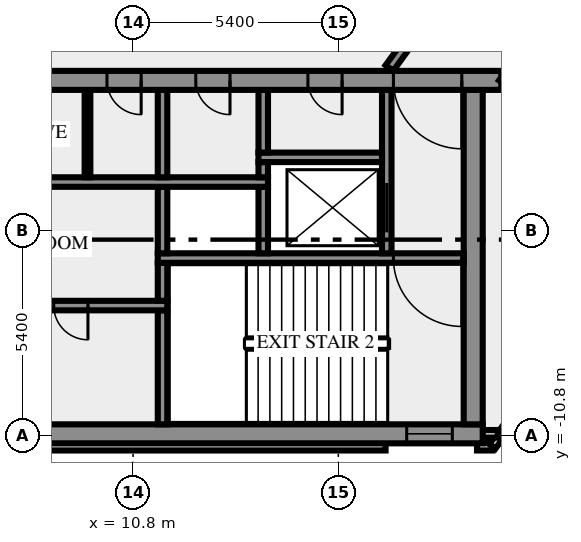
"""IFC4 building model, lengths in metres.
Left out: names, types, materials, properties, quantities, classifications, styles, units other than length and angle.
Written with IfcOpenShell. Run it as: python <this file> out.ifc"""

import sys

from ifc_helpers import new_model, si_unit, direction, frame, frame_2d, origin, place, context, subcontext, project, spatial, rectangle, extrude, element, fill, save


model = new_model("IFC4")
c1 = context("Model", 3, precision=1e-05, world=origin(), true_north=direction((0.0, 1.0)))
c2 = subcontext(c1, "Body", "Model", "MODEL_VIEW")
j1 = project(units=[si_unit("LENGTHUNIT", "METRE"), si_unit("PLANEANGLEUNIT", "RADIAN")], contexts=[c1])
p1 = place(None, origin())
s1 = spatial("IfcSite", under=j1, at=p1, CompositionType="ELEMENT")
p2 = place(p1, origin())
s2 = spatial("IfcBuilding", under=s1, at=p2, CompositionType="ELEMENT")
p3 = place(p2, frame((0.0, 0.0, 269.0)))
s3 = spatial("IfcBuildingStorey", under=s2, at=p3, CompositionType="ELEMENT", Elevation=269.0)
p4 = place(p3, frame((-17.444, -11.088, 0.0), z_axis=(0.0, 0.0, 1.0), x_axis=(1.0, 0.0, 0.0)))
e1 = element("IfcWall", 1, at=p4, inside=s3, PredefinedType="SOLIDWALL", context=c2, shape_type="SweptSolid", body=[
    extrude(rectangle(XDim=34.888, YDim=0.2, at=frame_2d((17.444, 0.0))), origin(), (0.0, 0.0, 1.0), 3.5),
])
p5 = place(p3, frame((19.85, -11.088, 0.0), z_axis=(0.0, 0.0, 1.0), x_axis=(1.0, 0.0, 0.0)))
e2 = element("IfcWall", 2, at=p5, inside=s3, PredefinedType="SOLIDWALL", context=c2, shape_type="SweptSolid", body=[
    extrude(rectangle(XDim=0.406, YDim=0.2, at=frame_2d((0.203, 0.0))), origin(), (0.0, 0.0, 1.0), 3.5),
])
p6 = place(p3, frame((20.253, -11.083, 0.0), z_axis=(0.0, 0.0, 1.0), x_axis=(0.587766567315, 0.809030569476, 0.0)))
e3 = element("IfcWall", 3, at=p6, inside=s3, PredefinedType="SOLIDWALL", context=c2, shape_type="SweptSolid", body=[
    extrude(rectangle(XDim=2.688, YDim=0.2, at=frame_2d((1.344, 0.0))), origin(), (0.0, 0.0, 1.0), 3.5),
])
p7 = place(p3, frame((19.98, -10.75, 0.0), z_axis=(0.0, 0.0, 1.0), x_axis=(1.0, 0.0, 0.0)))
e4 = element("IfcWall", 4, at=p7, inside=s3, PredefinedType="SOLIDWALL", context=c2, shape_type="SweptSolid", body=[
    extrude(rectangle(XDim=0.417, YDim=0.2, at=frame_2d((0.208, 0.0))), origin(), (0.0, 0.0, 1.0), 3.5),
])
p8 = place(p3, frame((-20.0, -10.75, 0.0), z_axis=(0.0, 0.0, 1.0), x_axis=(1.0, 0.0, 0.0)))
e5 = element("IfcWall", 5, at=p8, inside=s3, PredefinedType="SHEAR", context=c2, shape_type="SweptSolid", body=[
    extrude(rectangle(XDim=40.0, YDim=0.5, at=frame_2d((20.0, 0.0))), origin(), (0.0, 0.0, 1.0), 3.5),
])
p9 = place(p8, frame((0.8, 0.0, 1.0)))
e6 = element("IfcOpeningElement", 6, at=p9, cuts=e5, PredefinedType="OPENING", context=c2, shape_type="SweptSolid", body=[
    extrude(rectangle(XDim=1.2, YDim=1.2, at=frame_2d((0.6, 0.6))), frame((0.0, 0.26, 0.0), z_axis=(0.0, -1.0, 0.0), x_axis=(1.0, 0.0, 0.0)), (0.0, 0.0, 1.0), 0.52),
])
p10 = place(p8, frame((38.0, 0.0, 1.0)))
e7 = element("IfcOpeningElement", 7, at=p10, cuts=e5, PredefinedType="OPENING", context=c2, shape_type="SweptSolid", body=[
    extrude(rectangle(XDim=1.2, YDim=1.2, at=frame_2d((0.6, 0.6))), frame((0.0, 0.26, 0.0), z_axis=(0.0, -1.0, 0.0), x_axis=(1.0, 0.0, 0.0)), (0.0, 0.0, 1.0), 0.52),
])
p11 = place(p3, frame((11.575, -10.5, 0.0), z_axis=(0.0, 0.0, 1.0), x_axis=(0.0, 1.0, 0.0)))
e8 = element("IfcWall", 8, at=p11, inside=s3, PredefinedType="SHEAR", context=c2, shape_type="SweptSolid", body=[
    extrude(rectangle(XDim=3.0, YDim=0.25, at=frame_2d((1.5, 0.0))), origin(), (0.0, 0.0, 1.0), 3.5),
])
p12 = place(p3, frame((19.75, -10.5, 0.0), z_axis=(0.0, 0.0, 1.0), x_axis=(0.0, 1.0, 0.0)))
e9 = element("IfcWall", 9, at=p12, inside=s3, PredefinedType="SHEAR", context=c2, shape_type="SweptSolid", body=[
    extrude(rectangle(XDim=8.8, YDim=0.5, at=frame_2d((4.4, 0.0))), origin(), (0.0, 0.0, 1.0), 3.5),
])
p13 = place(p3, frame((11.7, -7.375, 0.0), z_axis=(0.0, 0.0, 1.0), x_axis=(-1.0, 0.0, 0.0)))
e10 = element("IfcWall", 10, at=p13, inside=s3, PredefinedType="SHEAR", context=c2, shape_type="SweptSolid", body=[
    extrude(rectangle(XDim=23.4, YDim=0.25, at=frame_2d((11.7, 0.0))), origin(), (0.0, 0.0, 1.0), 3.5),
])
p14 = place(p13, frame((22.225, 0.0, 0.0)))
e11 = element("IfcOpeningElement", 11, at=p14, cuts=e10, PredefinedType="OPENING", context=c2, shape_type="SweptSolid", body=[
    extrude(rectangle(XDim=0.8, YDim=2.1, at=frame_2d((0.4, 1.05))), frame((0.0, 0.135, 0.0), z_axis=(0.0, -1.0, 0.0), x_axis=(1.0, 0.0, 0.0)), (0.0, 0.0, 1.0), 0.27),
])
p15 = place(p13, frame((20.2, 0.0, 0.0)))
e12 = element("IfcOpeningElement", 12, at=p15, cuts=e10, PredefinedType="OPENING", context=c2, shape_type="SweptSolid", body=[
    extrude(rectangle(XDim=1.1, YDim=2.1, at=frame_2d((0.55, 1.05))), frame((0.0, 0.135, 0.0), z_axis=(0.0, -1.0, 0.0), x_axis=(1.0, 0.0, 0.0)), (0.0, 0.0, 1.0), 0.27),
])
p16 = place(p13, frame((17.7, 0.0, 0.0)))
e13 = element("IfcOpeningElement", 13, at=p16, cuts=e10, PredefinedType="OPENING", context=c2, shape_type="SweptSolid", body=[
    extrude(rectangle(XDim=1.1, YDim=2.1, at=frame_2d((0.55, 1.05))), frame((0.0, 0.135, 0.0), z_axis=(0.0, -1.0, 0.0), x_axis=(1.0, 0.0, 0.0)), (0.0, 0.0, 1.0), 0.27),
])
p17 = place(p13, frame((15.975, 0.0, 0.0)))
e14 = element("IfcOpeningElement", 14, at=p17, cuts=e10, PredefinedType="OPENING", context=c2, shape_type="SweptSolid", body=[
    extrude(rectangle(XDim=0.8, YDim=2.1, at=frame_2d((0.4, 1.05))), frame((0.0, 0.135, 0.0), z_axis=(0.0, -1.0, 0.0), x_axis=(1.0, 0.0, 0.0)), (0.0, 0.0, 1.0), 0.27),
])
p18 = place(p13, frame((14.75, 0.0, 0.0)))
e15 = element("IfcOpeningElement", 15, at=p18, cuts=e10, PredefinedType="OPENING", context=c2, shape_type="SweptSolid", body=[
    extrude(rectangle(XDim=0.7, YDim=2.1, at=frame_2d((0.35, 1.05))), frame((0.0, 0.135, 0.0), z_axis=(0.0, -1.0, 0.0), x_axis=(1.0, 0.0, 0.0)), (0.0, 0.0, 1.0), 0.27),
])
p19 = place(p13, frame((13.35, 0.0, 0.0)))
e16 = element("IfcOpeningElement", 16, at=p19, cuts=e10, PredefinedType="OPENING", context=c2, shape_type="SweptSolid", body=[
    extrude(rectangle(XDim=0.9, YDim=2.1, at=frame_2d((0.45, 1.05))), frame((0.0, 0.135, 0.0), z_axis=(0.0, -1.0, 0.0), x_axis=(1.0, 0.0, 0.0)), (0.0, 0.0, 1.0), 0.27),
])
p20 = place(p13, frame((11.975, 0.0, 0.0)))
e17 = element("IfcOpeningElement", 17, at=p20, cuts=e10, PredefinedType="OPENING", context=c2, shape_type="SweptSolid", body=[
    extrude(rectangle(XDim=0.9, YDim=2.1, at=frame_2d((0.45, 1.05))), frame((0.0, 0.135, 0.0), z_axis=(0.0, -1.0, 0.0), x_axis=(1.0, 0.0, 0.0)), (0.0, 0.0, 1.0), 0.27),
])
p21 = place(p13, frame((10.5, 0.0, 0.0)))
e18 = element("IfcOpeningElement", 18, at=p21, cuts=e10, PredefinedType="OPENING", context=c2, shape_type="SweptSolid", body=[
    extrude(rectangle(XDim=0.9, YDim=2.1, at=frame_2d((0.45, 1.05))), frame((0.0, 0.135, 0.0), z_axis=(0.0, -1.0, 0.0), x_axis=(1.0, 0.0, 0.0)), (0.0, 0.0, 1.0), 0.27),
])
p22 = place(p13, frame((8.663, 0.0, 0.0)))
e19 = element("IfcOpeningElement", 19, at=p22, cuts=e10, PredefinedType="OPENING", context=c2, shape_type="SweptSolid", body=[
    extrude(rectangle(XDim=0.9, YDim=2.1, at=frame_2d((0.45, 1.05))), frame((0.0, 0.135, 0.0), z_axis=(0.0, -1.0, 0.0), x_axis=(1.0, 0.0, 0.0)), (0.0, 0.0, 1.0), 0.27),
])
p23 = place(p13, frame((6.05, 0.0, 0.0)))
e20 = element("IfcOpeningElement", 20, at=p23, cuts=e10, PredefinedType="OPENING", context=c2, shape_type="SweptSolid", body=[
    extrude(rectangle(XDim=0.9, YDim=2.1, at=frame_2d((0.45, 1.05))), frame((0.0, 0.135, 0.0), z_axis=(0.0, -1.0, 0.0), x_axis=(1.0, 0.0, 0.0)), (0.0, 0.0, 1.0), 0.27),
])
p24 = place(p13, frame((2.088, 0.0, 0.0)))
e21 = element("IfcOpeningElement", 21, at=p24, cuts=e10, PredefinedType="OPENING", context=c2, shape_type="SweptSolid", body=[
    extrude(rectangle(XDim=0.9, YDim=2.1, at=frame_2d((0.45, 1.05))), frame((0.0, 0.135, 0.0), z_axis=(0.0, -1.0, 0.0), x_axis=(1.0, 0.0, 0.0)), (0.0, 0.0, 1.0), 0.27),
])
p25 = place(p3, frame((11.575, -7.25, 0.0), z_axis=(0.0, 0.0, 1.0), x_axis=(0.0, 1.0, 0.0)))
e22 = element("IfcWall", 22, at=p25, inside=s3, PredefinedType="SHEAR", context=c2, shape_type="SweptSolid", body=[
    extrude(rectangle(XDim=1.0, YDim=0.25, at=frame_2d((0.5, 0.0))), origin(), (0.0, 0.0, 1.0), 3.5),
])
p26 = place(p3, frame((19.5, -6.125, 0.0), z_axis=(0.0, 0.0, 1.0), x_axis=(-1.0, 0.0, 0.0)))
e23 = element("IfcWall", 23, at=p26, inside=s3, PredefinedType="SHEAR", context=c2, shape_type="SweptSolid", body=[
    extrude(rectangle(XDim=8.05, YDim=0.25, at=frame_2d((4.025, 0.0))), origin(), (0.0, 0.0, 1.0), 3.5),
])
p27 = place(p26, frame((0.05, 0.0, 0.0)))
e24 = element("IfcOpeningElement", 24, at=p27, cuts=e23, PredefinedType="OPENING", context=c2, shape_type="SweptSolid", body=[
    extrude(rectangle(XDim=1.8, YDim=2.1, at=frame_2d((0.9, 1.05))), frame((0.0, 0.135, 0.0), z_axis=(0.0, -1.0, 0.0), x_axis=(1.0, 0.0, 0.0)), (0.0, 0.0, 1.0), 0.27),
])
for number, where, z_axis, x_axis in (
    (25, (11.575, -6.0, 0.0), (0.0, 0.0, 1.0), (0.0, 1.0, 0.0)),
    (26, (14.225, -6.0, 0.0), (0.0, 0.0, 1.0), (0.0, 1.0, 0.0)),
):
    element("IfcWall", number, at=place(p3, frame(where, z_axis=z_axis, x_axis=x_axis)), inside=s3, PredefinedType="SHEAR", context=c2, shape_type="SweptSolid", body=[
        extrude(rectangle(XDim=1.75, YDim=0.25, at=frame_2d((0.875, 0.0))), origin(), (0.0, 0.0, 1.0), 3.5),
    ])
p28 = place(p3, frame((17.475, -6.0, 0.0), z_axis=(0.0, 0.0, 1.0), x_axis=(0.0, 1.0, 0.0)))
e27 = element("IfcWall", 27, at=p28, inside=s3, PredefinedType="SHEAR", context=c2, shape_type="SweptSolid", body=[
    extrude(rectangle(XDim=4.3, YDim=0.25, at=frame_2d((2.15, 0.0))), origin(), (0.0, 0.0, 1.0), 3.5),
])
p29 = place(p28, frame((0.55, 0.0, 0.0)))
e28 = element("IfcOpeningElement", 28, at=p29, cuts=e27, PredefinedType="OPENING", context=c2, shape_type="SweptSolid", body=[
    extrude(rectangle(XDim=1.3, YDim=2.1, at=frame_2d((0.65, 1.05))), frame((0.0, 0.135, 0.0), z_axis=(0.0, -1.0, 0.0), x_axis=(1.0, 0.0, 0.0)), (0.0, 0.0, 1.0), 0.27),
])
p30 = place(p3, frame((1.45, -4.125, 0.0), z_axis=(0.0, 0.0, 1.0), x_axis=(1.0, 0.0, 0.0)))
e29 = element("IfcWall", 29, at=p30, inside=s3, PredefinedType="SHEAR", context=c2, shape_type="SweptSolid", body=[
    extrude(rectangle(XDim=12.9, YDim=0.25, at=frame_2d((6.45, 0.0))), origin(), (0.0, 0.0, 1.0), 3.5),
])
p31 = place(p30, frame((0.7, 0.0, 0.0)))
e30 = element("IfcOpeningElement", 30, at=p31, cuts=e29, PredefinedType="OPENING", context=c2, shape_type="SweptSolid", body=[
    extrude(rectangle(XDim=1.3, YDim=2.1, at=frame_2d((0.65, 1.05))), frame((0.0, 0.135, 0.0), z_axis=(0.0, -1.0, 0.0), x_axis=(1.0, 0.0, 0.0)), (0.0, 0.0, 1.0), 0.27),
])
p32 = place(p3, frame((9.6, -4.0, 0.0), z_axis=(0.0, 0.0, 1.0), x_axis=(0.0, 1.0, 0.0)))
e31 = element("IfcWall", 31, at=p32, inside=s3, PredefinedType="PARTITIONING", context=c2, shape_type="SweptSolid", body=[
    extrude(rectangle(XDim=2.3, YDim=0.15, at=frame_2d((1.15, 0.0))), origin(), (0.0, 0.0, 1.0), 3.5),
])
p33 = place(p3, frame((11.575, -4.0, 0.0), z_axis=(0.0, 0.0, 1.0), x_axis=(0.0, 1.0, 0.0)))
e32 = element("IfcWall", 32, at=p33, inside=s3, PredefinedType="SHEAR", context=c2, shape_type="SweptSolid", body=[
    extrude(rectangle(XDim=2.3, YDim=0.25, at=frame_2d((1.15, 0.0))), origin(), (0.0, 0.0, 1.0), 3.5),
])
p34 = place(p3, frame((14.225, -4.0, 0.0), z_axis=(0.0, 0.0, 1.0), x_axis=(0.0, 1.0, 0.0)))
e33 = element("IfcWall", 33, at=p34, inside=s3, PredefinedType="SHEAR", context=c2, shape_type="SweptSolid", body=[
    extrude(rectangle(XDim=0.4, YDim=0.25, at=frame_2d((0.2, 0.0))), origin(), (0.0, 0.0, 1.0), 3.5),
])
p35 = place(p3, frame((14.1, -3.475, 0.0), z_axis=(0.0, 0.0, 1.0), x_axis=(1.0, 0.0, 0.0)))
e34 = element("IfcWall", 34, at=p35, inside=s3, PredefinedType="SHEAR", context=c2, shape_type="SweptSolid", body=[
    extrude(rectangle(XDim=3.25, YDim=0.25, at=frame_2d((1.625, 0.0))), origin(), (0.0, 0.0, 1.0), 3.5),
])
p36 = place(p3, frame((14.225, -3.35, 0.0), z_axis=(0.0, 0.0, 1.0), x_axis=(0.0, 1.0, 0.0)))
e35 = element("IfcWall", 35, at=p36, inside=s3, PredefinedType="SHEAR", context=c2, shape_type="SweptSolid", body=[
    extrude(rectangle(XDim=1.65, YDim=0.25, at=frame_2d((0.825, 0.0))), origin(), (0.0, 0.0, 1.0), 3.5),
])
p37 = place(p3, frame((20.49, -1.45, 0.0), z_axis=(0.0, 0.0, 1.0), x_axis=(-1.0, 0.0, 0.0)))
e36 = element("IfcWall", 36, at=p37, inside=s3, PredefinedType="SHEAR", context=c2, shape_type="SweptSolid", body=[
    extrude(rectangle(XDim=40.98, YDim=0.5, at=frame_2d((20.49, 0.0))), origin(), (0.0, 0.0, 1.0), 3.5),
])
p38 = place(p37, frame((38.14, 0.0, 0.0)))
e37 = element("IfcOpeningElement", 37, at=p38, cuts=e36, PredefinedType="OPENING", context=c2, shape_type="SweptSolid", body=[
    extrude(rectangle(XDim=1.8, YDim=2.1, at=frame_2d((0.9, 1.05))), frame((0.0, 0.26, 0.0), z_axis=(0.0, -1.0, 0.0), x_axis=(1.0, 0.0, 0.0)), (0.0, 0.0, 1.0), 0.52),
])
p39 = place(p37, frame((36.728, 0.0, 0.0)))
e38 = element("IfcOpeningElement", 38, at=p39, cuts=e36, PredefinedType="OPENING", context=c2, shape_type="SweptSolid", body=[
    extrude(rectangle(XDim=0.8, YDim=2.1, at=frame_2d((0.4, 1.05))), frame((0.0, 0.26, 0.0), z_axis=(0.0, -1.0, 0.0), x_axis=(1.0, 0.0, 0.0)), (0.0, 0.0, 1.0), 0.52),
])
p40 = place(p37, frame((35.153, 0.0, 0.0)))
e39 = element("IfcOpeningElement", 39, at=p40, cuts=e36, PredefinedType="OPENING", context=c2, shape_type="SweptSolid", body=[
    extrude(rectangle(XDim=0.8, YDim=2.1, at=frame_2d((0.4, 1.05))), frame((0.0, 0.26, 0.0), z_axis=(0.0, -1.0, 0.0), x_axis=(1.0, 0.0, 0.0)), (0.0, 0.0, 1.0), 0.52),
])
p41 = place(p37, frame((32.94, 0.0, 0.0)))
e40 = element("IfcOpeningElement", 40, at=p41, cuts=e36, PredefinedType="OPENING", context=c2, shape_type="SweptSolid", body=[
    extrude(rectangle(XDim=0.9, YDim=2.1, at=frame_2d((0.45, 1.05))), frame((0.0, 0.26, 0.0), z_axis=(0.0, -1.0, 0.0), x_axis=(1.0, 0.0, 0.0)), (0.0, 0.0, 1.0), 0.52),
])
p42 = place(p37, frame((31.015, 0.0, 0.0)))
e41 = element("IfcOpeningElement", 41, at=p42, cuts=e36, PredefinedType="OPENING", context=c2, shape_type="SweptSolid", body=[
    extrude(rectangle(XDim=0.8, YDim=2.1, at=frame_2d((0.4, 1.05))), frame((0.0, 0.26, 0.0), z_axis=(0.0, -1.0, 0.0), x_axis=(1.0, 0.0, 0.0)), (0.0, 0.0, 1.0), 0.52),
])
p43 = place(p37, frame((24.765, 0.0, 0.0)))
e42 = element("IfcOpeningElement", 42, at=p43, cuts=e36, PredefinedType="OPENING", context=c2, shape_type="SweptSolid", body=[
    extrude(rectangle(XDim=0.8, YDim=2.1, at=frame_2d((0.4, 1.05))), frame((0.0, 0.26, 0.0), z_axis=(0.0, -1.0, 0.0), x_axis=(1.0, 0.0, 0.0)), (0.0, 0.0, 1.0), 0.52),
])
p44 = place(p37, frame((19.59, 0.0, 0.0)))
e43 = element("IfcOpeningElement", 43, at=p44, cuts=e36, PredefinedType="OPENING", context=c2, shape_type="SweptSolid", body=[
    extrude(rectangle(XDim=2.0, YDim=2.1, at=frame_2d((1.0, 1.05))), frame((0.0, 0.26, 0.0), z_axis=(0.0, -1.0, 0.0), x_axis=(1.0, 0.0, 0.0)), (0.0, 0.0, 1.0), 0.52),
])
p45 = place(p37, frame((13.202, 0.0, 0.0)))
e44 = element("IfcOpeningElement", 44, at=p45, cuts=e36, PredefinedType="OPENING", context=c2, shape_type="SweptSolid", body=[
    extrude(rectangle(XDim=0.9, YDim=2.1, at=frame_2d((0.45, 1.05))), frame((0.0, 0.26, 0.0), z_axis=(0.0, -1.0, 0.0), x_axis=(1.0, 0.0, 0.0)), (0.0, 0.0, 1.0), 0.52),
])
p46 = place(p37, frame((9.478, 0.0, 0.0)))
e45 = element("IfcOpeningElement", 45, at=p46, cuts=e36, PredefinedType="OPENING", context=c2, shape_type="SweptSolid", body=[
    extrude(rectangle(XDim=0.9, YDim=2.1, at=frame_2d((0.45, 1.05))), frame((0.0, 0.26, 0.0), z_axis=(0.0, -1.0, 0.0), x_axis=(1.0, 0.0, 0.0)), (0.0, 0.0, 1.0), 0.52),
])
p47 = place(p37, frame((7.14, 0.0, 0.0)))
e46 = element("IfcOpeningElement", 46, at=p47, cuts=e36, PredefinedType="OPENING", context=c2, shape_type="SweptSolid", body=[
    extrude(rectangle(XDim=0.9, YDim=2.1, at=frame_2d((0.45, 1.05))), frame((0.0, 0.26, 0.0), z_axis=(0.0, -1.0, 0.0), x_axis=(1.0, 0.0, 0.0)), (0.0, 0.0, 1.0), 0.52),
])
p48 = place(p37, frame((4.19, 0.0, 0.0)))
e47 = element("IfcOpeningElement", 47, at=p48, cuts=e36, PredefinedType="OPENING", context=c2, shape_type="SweptSolid", body=[
    extrude(rectangle(XDim=0.9, YDim=2.1, at=frame_2d((0.45, 1.05))), frame((0.0, 0.26, 0.0), z_axis=(0.0, -1.0, 0.0), x_axis=(1.0, 0.0, 0.0)), (0.0, 0.0, 1.0), 0.52),
])
p49 = place(p37, frame((1.04, 0.0, 0.0)))
e48 = element("IfcOpeningElement", 48, at=p49, cuts=e36, PredefinedType="OPENING", context=c2, shape_type="SweptSolid", body=[
    extrude(rectangle(XDim=1.8, YDim=2.1, at=frame_2d((0.9, 1.05))), frame((0.0, 0.26, 0.0), z_axis=(0.0, -1.0, 0.0), x_axis=(1.0, 0.0, 0.0)), (0.0, 0.0, 1.0), 0.52),
])
p50 = place(p3, frame((17.545, -1.125, 0.0), z_axis=(0.0, 0.0, 1.0), x_axis=(0.58779555165, 0.809009511354, 0.0)))
e49 = element("IfcWall", 49, at=p50, inside=s3, PredefinedType="SOLIDWALL", context=c2, shape_type="SweptSolid", body=[
    extrude(rectangle(XDim=18.103, YDim=0.25, at=frame_2d((9.052, 0.0))), origin(), (0.0, 0.0, 1.0), 3.5),
])
p51 = place(p50, frame((16.728, 0.0, 0.0)))
e50 = element("IfcOpeningElement", 50, at=p51, cuts=e49, PredefinedType="OPENING", context=c2, shape_type="SweptSolid", body=[
    extrude(rectangle(XDim=0.9, YDim=2.1, at=frame_2d((0.45, 1.05))), frame((0.0, 0.135, 0.0), z_axis=(0.0, -1.0, 0.0), x_axis=(1.0, 0.0, 0.0)), (0.0, 0.0, 1.0), 0.27),
])
p52 = place(p3, frame((30.183, 11.761, 0.0), z_axis=(0.0, 0.0, 1.0), x_axis=(-0.587781762867, -0.80901952958, 0.0)))
e51 = element("IfcWall", 51, at=p52, inside=s3, PredefinedType="SOLIDWALL", context=c2, shape_type="SweptSolid", body=[
    extrude(rectangle(XDim=16.42, YDim=0.25, at=frame_2d((8.21, 0.0))), origin(), (0.0, 0.0, 1.0), 3.5),
])
p53 = place(p52, frame((5.005, 0.0, 0.0)))
e52 = element("IfcOpeningElement", 52, at=p53, cuts=e51, PredefinedType="OPENING", context=c2, shape_type="SweptSolid", body=[
    extrude(rectangle(XDim=0.9, YDim=2.1, at=frame_2d((0.45, 1.05))), frame((0.0, 0.135, 0.0), z_axis=(0.0, -1.0, 0.0), x_axis=(1.0, 0.0, 0.0)), (0.0, 0.0, 1.0), 0.27),
])
p54 = place(p52, frame((14.988, 0.0, 0.0)))
e53 = element("IfcOpeningElement", 53, at=p54, cuts=e51, PredefinedType="OPENING", context=c2, shape_type="SweptSolid", body=[
    extrude(rectangle(XDim=0.9, YDim=2.1, at=frame_2d((0.45, 1.05))), frame((0.0, 0.135, 0.0), z_axis=(0.0, -1.0, 0.0), x_axis=(1.0, 0.0, 0.0)), (0.0, 0.0, 1.0), 0.27),
])
p55 = place(p10, origin())
e54 = element("IfcWindow", 54, at=p55, inside=s3, PartitioningType="SINGLE_PANEL", PredefinedType="WINDOW", context=c2, shape_type="SweptSolid", body=[
    extrude(rectangle(XDim=1.2, YDim=1.2, at=frame_2d((0.6, 0.6))), frame((0.0, 0.03, 0.0), z_axis=(0.0, -1.0, 0.0), x_axis=(1.0, 0.0, 0.0)), (0.0, 0.0, 1.0), 0.06),
])
fill(e7, e54)
p56 = place(p24, origin())
e55 = element("IfcDoor", 55, at=p56, inside=s3, OperationType="SINGLE_SWING_LEFT", PredefinedType="DOOR", context=c2, shape_type="SweptSolid", body=[
    extrude(rectangle(XDim=0.9, YDim=2.1, at=frame_2d((0.45, 1.05))), frame((0.0, 0.025, 0.0), z_axis=(0.0, -1.0, 0.0), x_axis=(1.0, 0.0, 0.0)), (0.0, 0.0, 1.0), 0.05),
])
fill(e21, e55)
p57 = place(p27, origin())
e56 = element("IfcDoor", 56, at=p57, inside=s3, OperationType="DOUBLE_DOOR_SINGLE_SWING", PredefinedType="DOOR", context=c2, shape_type="SweptSolid", body=[
    extrude(rectangle(XDim=1.8, YDim=2.1, at=frame_2d((0.9, 1.05))), frame((0.0, 0.025, 0.0), z_axis=(0.0, -1.0, 0.0), x_axis=(1.0, 0.0, 0.0)), (0.0, 0.0, 1.0), 0.05),
])
fill(e24, e56)
p58 = place(p29, origin())
e57 = element("IfcDoor", 57, at=p58, inside=s3, OperationType="DOUBLE_DOOR_SLIDING", PredefinedType="DOOR", context=c2, shape_type="SweptSolid", body=[
    extrude(rectangle(XDim=1.3, YDim=2.1, at=frame_2d((0.65, 1.05))), frame((0.0, 0.025, 0.0), z_axis=(0.0, -1.0, 0.0), x_axis=(1.0, 0.0, 0.0)), (0.0, 0.0, 1.0), 0.05),
])
fill(e28, e57)
p59 = place(p46, origin())
e58 = element("IfcDoor", 58, at=p59, inside=s3, OperationType="SINGLE_SWING_LEFT", PredefinedType="DOOR", context=c2, shape_type="SweptSolid", body=[
    extrude(rectangle(XDim=0.9, YDim=2.1, at=frame_2d((0.45, 1.05))), frame((0.0, 0.025, 0.0), z_axis=(0.0, -1.0, 0.0), x_axis=(1.0, 0.0, 0.0)), (0.0, 0.0, 1.0), 0.05),
])
fill(e45, e58)
p60 = place(p47, origin())
e59 = element("IfcDoor", 59, at=p60, inside=s3, OperationType="SINGLE_SWING_LEFT", PredefinedType="DOOR", context=c2, shape_type="SweptSolid", body=[
    extrude(rectangle(XDim=0.9, YDim=2.1, at=frame_2d((0.45, 1.05))), frame((0.0, 0.025, 0.0), z_axis=(0.0, -1.0, 0.0), x_axis=(1.0, 0.0, 0.0)), (0.0, 0.0, 1.0), 0.05),
])
fill(e46, e59)
p61 = place(p48, origin())
e60 = element("IfcDoor", 60, at=p61, inside=s3, OperationType="SINGLE_SWING_LEFT", PredefinedType="DOOR", context=c2, shape_type="SweptSolid", body=[
    extrude(rectangle(XDim=0.9, YDim=2.1, at=frame_2d((0.45, 1.05))), frame((0.0, 0.025, 0.0), z_axis=(0.0, -1.0, 0.0), x_axis=(1.0, 0.0, 0.0)), (0.0, 0.0, 1.0), 0.05),
])
fill(e47, e60)
p62 = place(p49, origin())
e61 = element("IfcDoor", 61, at=p62, inside=s3, OperationType="DOUBLE_DOOR_SINGLE_SWING", PredefinedType="DOOR", context=c2, shape_type="SweptSolid", body=[
    extrude(rectangle(XDim=1.8, YDim=2.1, at=frame_2d((0.9, 1.05))), frame((0.0, 0.025, 0.0), z_axis=(0.0, -1.0, 0.0), x_axis=(1.0, 0.0, 0.0)), (0.0, 0.0, 1.0), 0.05),
])
fill(e48, e61)
save(model, sys.argv[1])
